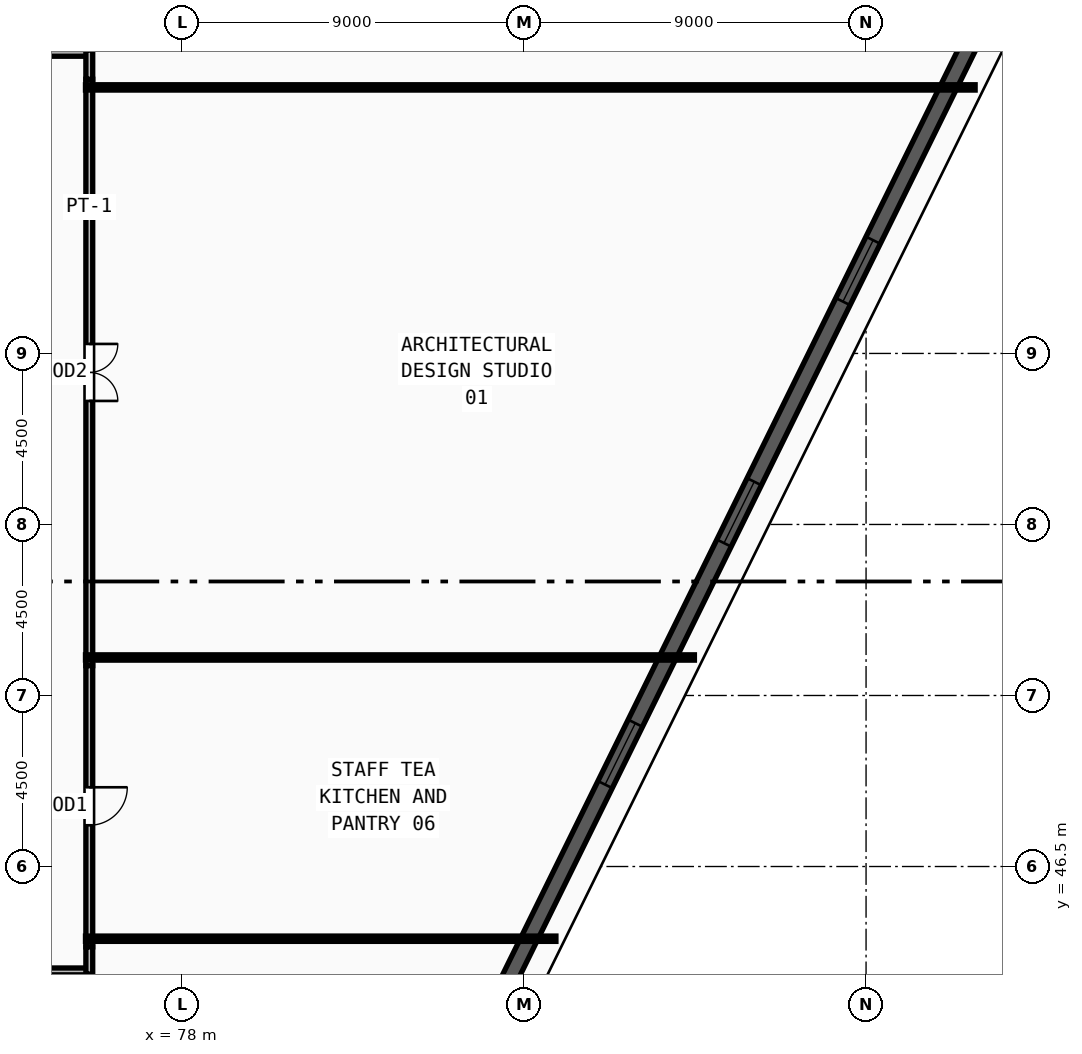
"""IFC4 building model, lengths in metres.
Left out: names, types, materials, properties, quantities, classifications, styles, units other than length and angle.
Written with IfcOpenShell. Run it as: python <this file> out.ifc"""

import sys

from ifc_helpers import new_model, si_unit, direction, frame, frame_2d, origin, place, context, subcontext, project, spatial, rectangle, extrude, source, transform, mapped, element, fill, save


model = new_model("IFC4")
c1 = context("Model", 3, precision=1e-05, world=origin(), true_north=direction((0.0, 1.0)))
c2 = subcontext(c1, "Body", "Model", "MODEL_VIEW")
j1 = project(units=[si_unit("LENGTHUNIT", "METRE"), si_unit("PLANEANGLEUNIT", "RADIAN")], contexts=[c1])
p1 = place(None, origin())
s1 = spatial("IfcSite", under=j1, at=p1, CompositionType="ELEMENT")
p2 = place(p1, origin())
s2 = spatial("IfcBuilding", under=s1, at=p2, CompositionType="ELEMENT")
p3 = place(p2, frame((0.0, 0.0, 28.5)))
s3 = spatial("IfcBuildingStorey", under=s2, at=p3, CompositionType="ELEMENT", Elevation=28.5)
p4 = place(p3, frame((86.402, 43.109, 0.0), z_axis=(0.0, 0.0, 1.0), x_axis=(0.441766083851, 0.897130273238, 0.0)))
e1 = element("IfcWall", 1, at=p4, inside=s3, PredefinedType="SOLIDWALL", context=c2, shape_type="SweptSolid", body=[
    extrude(rectangle(XDim=28.332, YDim=0.42, at=frame_2d((14.166, 0.0))), origin(), (0.0, 0.0, 1.0), 3.57),
])
m1 = source(origin(), c2, "Body", "SweptSolid", [
    extrude(rectangle(XDim=1.8, YDim=1.95, at=frame_2d((0.9, 0.975))), frame((0.0, 0.22, 0.0), z_axis=(0.0, -1.0, 0.0), x_axis=(1.0, 0.0, 0.0)), (0.0, 0.0, 1.0), 0.44),
])
p5 = place(p4, frame((6.183, 0.0, 0.55)))
e2 = element("IfcOpeningElement", 2, at=p5, cuts=e1, PredefinedType="OPENING", context=c2, shape_type="MappedRepresentation", body=[
    mapped(m1, transform((0.0, 0.0, 0.0), x_axis=(1.0, 0.0, 0.0), y_axis=(0.0, 1.0, 0.0), z_axis=(0.0, 0.0, 1.0), scale=1.0)),
])
p6 = place(p4, frame((13.266, 0.0, 0.55)))
e3 = element("IfcOpeningElement", 3, at=p6, cuts=e1, PredefinedType="OPENING", context=c2, shape_type="MappedRepresentation", body=[
    mapped(m1, transform((0.0, 0.0, 0.0), x_axis=(1.0, 0.0, 0.0), y_axis=(0.0, 1.0, 0.0), z_axis=(0.0, 0.0, 1.0), scale=1.0)),
])
p7 = place(p4, frame((20.349, 0.0, 0.55)))
e4 = element("IfcOpeningElement", 4, at=p7, cuts=e1, PredefinedType="OPENING", context=c2, shape_type="MappedRepresentation", body=[
    mapped(m1, transform((0.0, 0.0, 0.0), x_axis=(1.0, 0.0, 0.0), y_axis=(0.0, 1.0, 0.0), z_axis=(0.0, 0.0, 1.0), scale=1.0)),
])
p8 = place(p3, frame((75.56, 67.215, 0.0), z_axis=(0.0, 0.0, 1.0), x_axis=(0.0, -1.0, 0.0)))
e5 = element("IfcWall", 5, at=p8, inside=s3, PredefinedType="PARTITIONING", context=c2, shape_type="SweptSolid", body=[
    extrude(rectangle(XDim=15.43, YDim=0.18, at=frame_2d((7.715, 0.0))), origin(), (0.0, 0.0, 1.0), 3.57),
])
m2 = source(origin(), c2, "Body", "SweptSolid", [
    extrude(rectangle(XDim=1.5, YDim=2.2, at=frame_2d((0.75, 1.1))), frame((0.0, 0.1, 0.0), z_axis=(0.0, -1.0, 0.0), x_axis=(1.0, 0.0, 0.0)), (0.0, 0.0, 1.0), 0.2),
])
p9 = place(p8, frame((6.965, 0.0, 0.0)))
e6 = element("IfcOpeningElement", 6, at=p9, cuts=e5, PredefinedType="OPENING", context=c2, shape_type="MappedRepresentation", body=[
    mapped(m2, transform((0.0, 0.0, 0.0), x_axis=(1.0, 0.0, 0.0), y_axis=(0.0, 1.0, 0.0), z_axis=(0.0, 0.0, 1.0), scale=1.0)),
])
p10 = place(p3, frame((44.37, 67.91, 0.0), z_axis=(0.0, 0.0, 1.0), x_axis=(1.0, 0.0, 0.0)))
e7 = element("IfcWall", 7, at=p10, inside=s3, PredefinedType="PARTITIONING", context=c2, shape_type="SweptSolid", body=[
    extrude(rectangle(XDim=31.26, YDim=0.18, at=frame_2d((15.63, 0.0))), origin(), (0.0, 0.0, 1.0), 3.57),
])
p11 = place(p10, frame((14.88, 0.0, 0.0)))
e8 = element("IfcOpeningElement", 8, at=p11, cuts=e7, PredefinedType="OPENING", context=c2, shape_type="MappedRepresentation", body=[
    mapped(m2, transform((0.0, 0.0, 0.0), x_axis=(1.0, 0.0, 0.0), y_axis=(0.0, 1.0, 0.0), z_axis=(0.0, 0.0, 1.0), scale=1.0)),
])
p12 = place(p3, frame((75.63, 43.74, 0.0), z_axis=(0.0, 0.0, 1.0), x_axis=(-1.0, 0.0, 0.0)))
e9 = element("IfcWall", 9, at=p12, inside=s3, PredefinedType="PARTITIONING", context=c2, shape_type="SweptSolid", body=[
    extrude(rectangle(XDim=31.26, YDim=0.18, at=frame_2d((15.63, 0.0))), origin(), (0.0, 0.0, 1.0), 3.57),
])
p13 = place(p12, frame((9.78, 0.0, 0.0)))
e10 = element("IfcOpeningElement", 10, at=p13, cuts=e9, PredefinedType="OPENING", context=c2, shape_type="MappedRepresentation", body=[
    mapped(m2, transform((0.0, 0.0, 0.0), x_axis=(1.0, 0.0, 0.0), y_axis=(0.0, 1.0, 0.0), z_axis=(0.0, 0.0, 1.0), scale=1.0)),
])
p14 = place(p3, frame((75.56, 51.785, 0.0), z_axis=(0.0, 0.0, 1.0), x_axis=(0.0, -1.0, 0.0)))
e11 = element("IfcWall", 11, at=p14, inside=s3, PredefinedType="PARTITIONING", context=c2, shape_type="SweptSolid", body=[
    extrude(rectangle(XDim=7.4, YDim=0.18, at=frame_2d((3.7, 0.0))), origin(), (0.0, 0.0, 1.0), 3.57),
])
m3 = source(origin(), c2, "Body", "SweptSolid", [
    extrude(rectangle(XDim=1.0, YDim=2.2, at=frame_2d((0.5, 1.1))), frame((0.0, 0.1, 0.0), z_axis=(0.0, -1.0, 0.0), x_axis=(1.0, 0.0, 0.0)), (0.0, 0.0, 1.0), 0.2),
])
p15 = place(p14, frame((3.2, 0.0, 0.0)))
e12 = element("IfcOpeningElement", 12, at=p15, cuts=e11, PredefinedType="OPENING", context=c2, shape_type="MappedRepresentation", body=[
    mapped(m3, transform((0.0, 0.0, 0.0), x_axis=(1.0, 0.0, 0.0), y_axis=(0.0, 1.0, 0.0), z_axis=(0.0, 0.0, 1.0), scale=1.0)),
])
p16 = place(p3, frame((75.56, 67.98, 0.0), z_axis=(0.0, 0.0, 1.0), x_axis=(0.0, -1.0, 0.0)))
e13 = element("IfcWall", 13, at=p16, inside=s3, PredefinedType="PARTITIONING", context=c2, shape_type="SweptSolid", body=[
    extrude(rectangle(XDim=0.765, YDim=0.18, at=frame_2d((0.382, 0.0))), origin(), (0.0, 0.0, 1.0), 3.57),
])
p17 = place(p3, frame((75.56, 44.385, 0.0), z_axis=(0.0, 0.0, 1.0), x_axis=(0.0, -1.0, 0.0)))
e14 = element("IfcWall", 14, at=p17, inside=s3, PredefinedType="PARTITIONING", context=c2, shape_type="SweptSolid", body=[
    extrude(rectangle(XDim=0.715, YDim=0.18, at=frame_2d((0.357, 0.0))), origin(), (0.0, 0.0, 1.0), 3.57),
])
p18 = place(p3, frame((75.46, 44.6, 0.0), z_axis=(0.0, 0.0, 1.0), x_axis=(1.0, 0.0, 0.0)))
e15 = element("IfcWall", 15, at=p18, inside=s3, PredefinedType="PARTITIONING", context=c2, shape_type="SweptSolid", body=[
    extrude(rectangle(XDim=12.379, YDim=0.14, at=frame_2d((6.189, 0.0))), origin(), (0.0, 0.0, 1.0), 2.705),
])
p19 = place(p3, frame((75.46, 52.0, 0.0), z_axis=(0.0, 0.0, 1.0), x_axis=(1.0, 0.0, 0.0)))
e16 = element("IfcWall", 16, at=p19, inside=s3, PredefinedType="PARTITIONING", context=c2, shape_type="SweptSolid", body=[
    extrude(rectangle(XDim=16.023, YDim=0.14, at=frame_2d((8.011, 0.0))), origin(), (0.0, 0.0, 1.0), 3.57),
])
p20 = place(p3, frame((75.46, 67.0, 0.0), z_axis=(0.0, 0.0, 1.0), x_axis=(1.0, 0.0, 0.0)))
e17 = element("IfcWall", 17, at=p20, inside=s3, PredefinedType="PARTITIONING", context=c2, shape_type="SweptSolid", body=[
    extrude(rectangle(XDim=23.41, YDim=0.14, at=frame_2d((11.705, 0.0))), origin(), (0.0, 0.0, 1.0), 2.655),
])
m4 = source(origin(), c2, "Body", "SweptSolid", [
    extrude(rectangle(XDim=1.8, YDim=1.95, at=frame_2d((0.9, 0.975))), frame((0.0, 0.03, 0.0), z_axis=(0.0, -1.0, 0.0), x_axis=(1.0, 0.0, 0.0)), (0.0, 0.0, 1.0), 0.06),
])
p21 = place(p5, origin())
e18 = element("IfcWindow", 18, at=p21, inside=s3, PartitioningType="DOUBLE_PANEL_VERTICAL", PredefinedType="WINDOW", context=c2, shape_type="MappedRepresentation", body=[
    mapped(m4, transform((0.0, 0.0, 0.0), x_axis=(1.0, 0.0, 0.0), y_axis=(0.0, 1.0, 0.0), z_axis=(0.0, 0.0, 1.0), scale=1.0)),
])
fill(e2, e18)
p22 = place(p6, origin())
e19 = element("IfcWindow", 19, at=p22, inside=s3, PartitioningType="DOUBLE_PANEL_VERTICAL", PredefinedType="WINDOW", context=c2, shape_type="MappedRepresentation", body=[
    mapped(m4, transform((0.0, 0.0, 0.0), x_axis=(1.0, 0.0, 0.0), y_axis=(0.0, 1.0, 0.0), z_axis=(0.0, 0.0, 1.0), scale=1.0)),
])
fill(e3, e19)
p23 = place(p7, origin())
e20 = element("IfcWindow", 20, at=p23, inside=s3, PartitioningType="DOUBLE_PANEL_VERTICAL", PredefinedType="WINDOW", context=c2, shape_type="MappedRepresentation", body=[
    mapped(m4, transform((0.0, 0.0, 0.0), x_axis=(1.0, 0.0, 0.0), y_axis=(0.0, 1.0, 0.0), z_axis=(0.0, 0.0, 1.0), scale=1.0)),
])
fill(e4, e20)
m5 = source(origin(), c2, "Body", "SweptSolid", [
    extrude(rectangle(XDim=1.5, YDim=2.2, at=frame_2d((0.75, 1.1))), frame((0.0, 0.025, 0.0), z_axis=(0.0, -1.0, 0.0), x_axis=(1.0, 0.0, 0.0)), (0.0, 0.0, 1.0), 0.05),
])
p24 = place(p9, origin())
e21 = element("IfcDoor", 21, at=p24, inside=s3, OperationType="DOUBLE_DOOR_SINGLE_SWING", PredefinedType="DOOR", context=c2, shape_type="MappedRepresentation", body=[
    mapped(m5, transform((0.0, 0.0, 0.0), x_axis=(1.0, 0.0, 0.0), y_axis=(0.0, 1.0, 0.0), z_axis=(0.0, 0.0, 1.0), scale=1.0)),
])
fill(e6, e21)
m6 = source(origin(), c2, "Body", "SweptSolid", [
    extrude(rectangle(XDim=1.0, YDim=2.2, at=frame_2d((0.5, 1.1))), frame((0.0, 0.025, 0.0), z_axis=(0.0, -1.0, 0.0), x_axis=(1.0, 0.0, 0.0)), (0.0, 0.0, 1.0), 0.05),
])
p25 = place(p15, origin())
e22 = element("IfcDoor", 22, at=p25, inside=s3, OperationType="SINGLE_SWING_LEFT", PredefinedType="DOOR", context=c2, shape_type="MappedRepresentation", body=[
    mapped(m6, transform((0.0, 0.0, 0.0), x_axis=(1.0, 0.0, 0.0), y_axis=(0.0, 1.0, 0.0), z_axis=(0.0, 0.0, 1.0), scale=1.0)),
])
fill(e12, e22)
save(model, sys.argv[1])
